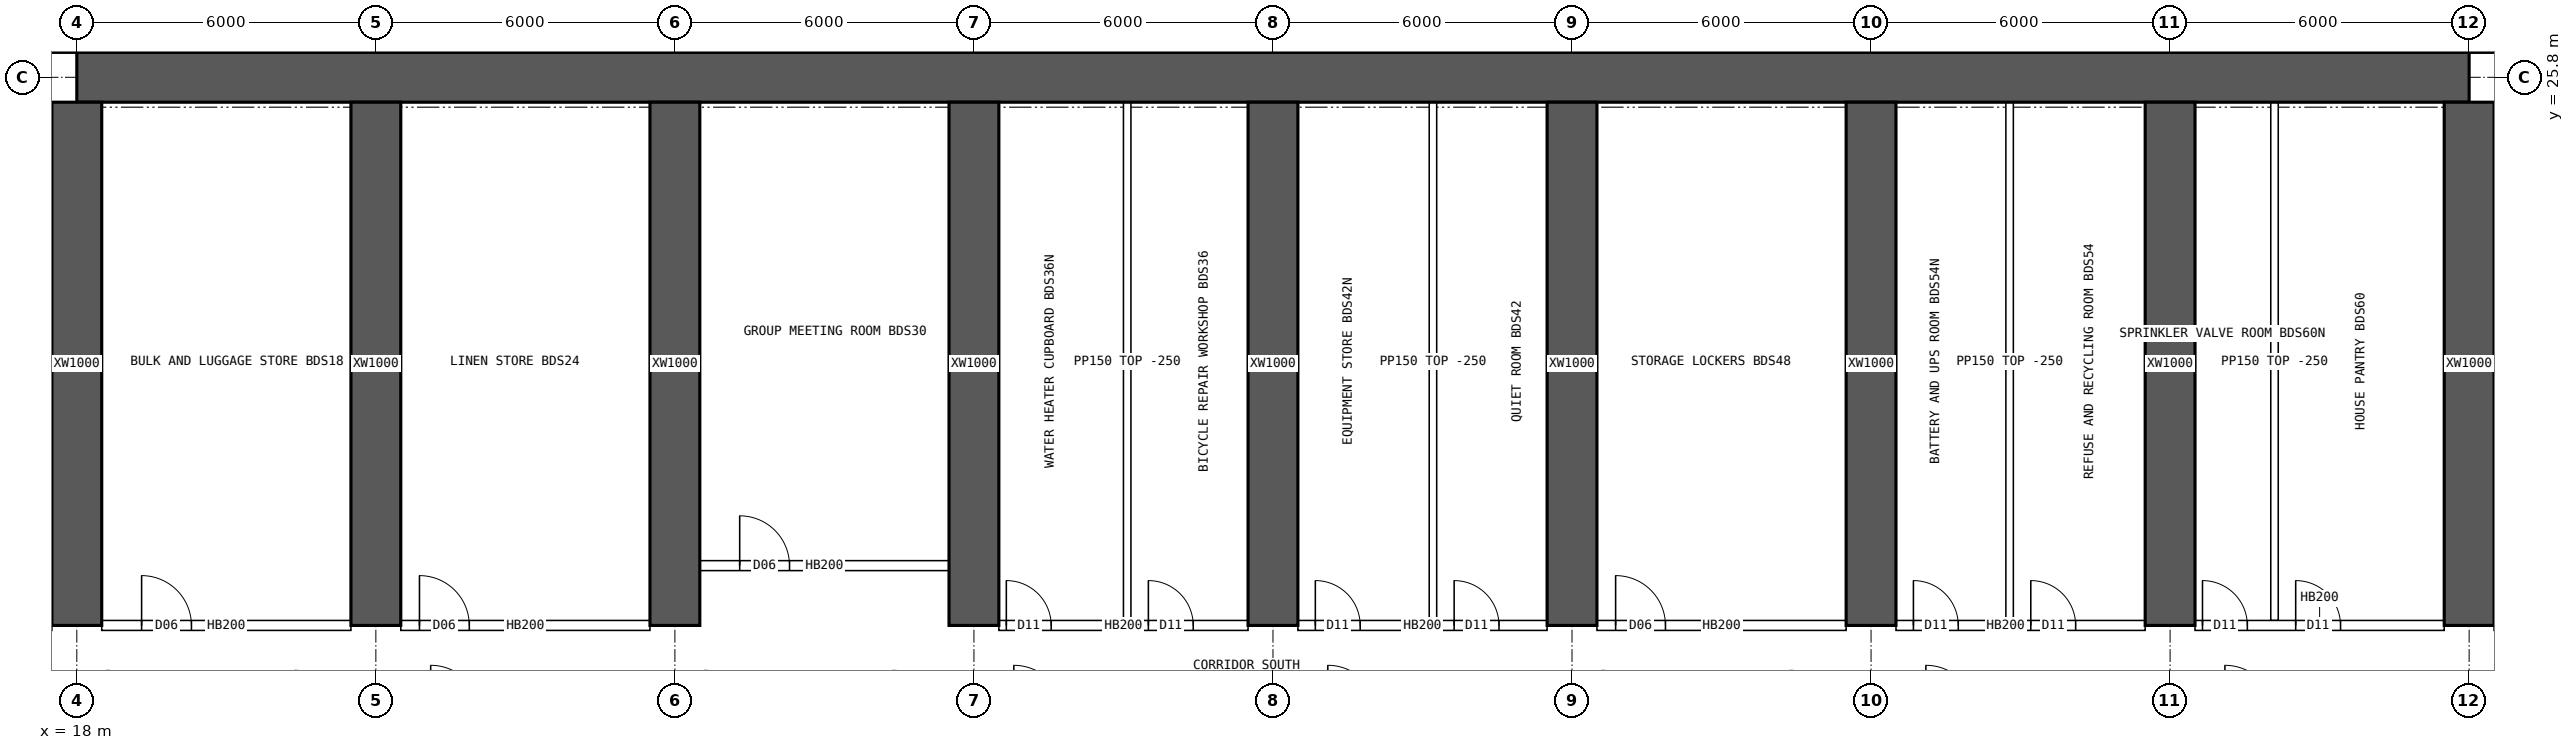
"""IFC4 building model, lengths in metres.
Left out: names, types, materials, properties, quantities, classifications, styles, units other than length and angle.
Written with IfcOpenShell. Run it as: python <this file> out.ifc"""

import sys

from ifc_helpers import new_model, si_unit, direction, frame, frame_2d, origin, place, context, subcontext, project, spatial, rectangle, extrude, element, fill, save


model = new_model("IFC4")
c1 = context("Model", 3, precision=1e-05, world=origin(), true_north=direction((0.0, 1.0)))
c2 = subcontext(c1, "Body", "Model", "MODEL_VIEW")
j1 = project(units=[si_unit("LENGTHUNIT", "METRE"), si_unit("PLANEANGLEUNIT", "RADIAN")], contexts=[c1])
p1 = place(None, origin())
s1 = spatial("IfcSite", under=j1, at=p1, CompositionType="ELEMENT")
p2 = place(p1, origin())
s2 = spatial("IfcBuilding", under=s1, at=p2, CompositionType="ELEMENT")
p3 = place(p2, frame((0.0, 0.0, 57.7)))
s3 = spatial("IfcBuildingStorey", under=s2, at=p3, CompositionType="ELEMENT", Elevation=57.7)
p4 = place(p3, frame((18.0, 25.8, 0.0), z_axis=(0.0, 0.0, 1.0), x_axis=(1.0, 0.0, 0.0)))
e1 = element("IfcWall", 1, at=p4, inside=s3, PredefinedType="SHEAR", context=c2, shape_type="SweptSolid", body=[
    extrude(rectangle(XDim=48.0, YDim=1.0, at=frame_2d((24.0, 0.0))), origin(), (0.0, 0.0, 1.0), 3.75),
])
for number, where, z_axis, x_axis in (
    (2, (18.0, 14.8, 0.0), (0.0, 0.0, 1.0), (0.0, 1.0, 0.0)),
    (3, (24.0, 14.8, 0.0), (0.0, 0.0, 1.0), (0.0, 1.0, 0.0)),
    (4, (30.0, 14.8, 0.0), (0.0, 0.0, 1.0), (0.0, 1.0, 0.0)),
    (5, (36.0, 14.8, 0.0), (0.0, 0.0, 1.0), (0.0, 1.0, 0.0)),
    (6, (42.0, 14.8, 0.0), (0.0, 0.0, 1.0), (0.0, 1.0, 0.0)),
    (7, (48.0, 14.8, 0.0), (0.0, 0.0, 1.0), (0.0, 1.0, 0.0)),
    (8, (54.0, 14.8, 0.0), (0.0, 0.0, 1.0), (0.0, 1.0, 0.0)),
    (9, (60.0, 14.8, 0.0), (0.0, 0.0, 1.0), (0.0, 1.0, 0.0)),
    (10, (66.0, 14.8, 0.0), (0.0, 0.0, 1.0), (0.0, 1.0, 0.0)),
):
    element("IfcWall", number, at=place(p3, frame(where, z_axis=z_axis, x_axis=x_axis)), inside=s3, PredefinedType="SHEAR", context=c2, shape_type="SweptSolid", body=[
        extrude(rectangle(XDim=10.5, YDim=1.0, at=frame_2d((5.25, 0.0))), origin(), (0.0, 0.0, 1.0), 3.75),
    ])
p5 = place(p3, frame((18.5, 14.8, 0.0), z_axis=(0.0, 0.0, 1.0), x_axis=(1.0, 0.0, 0.0)))
e11 = element("IfcWall", 11, at=p5, inside=s3, PredefinedType="SOLIDWALL", context=c2, shape_type="SweptSolid", body=[
    extrude(rectangle(XDim=5.0, YDim=0.2, at=frame_2d((2.5, 0.0))), origin(), (0.0, 0.0, 1.0), 3.5),
])
p6 = place(p5, frame((0.8, 0.0, 0.0)))
e12 = element("IfcOpeningElement", 12, at=p6, cuts=e11, PredefinedType="OPENING", context=c2, shape_type="SweptSolid", body=[
    extrude(rectangle(XDim=1.0, YDim=2.1, at=frame_2d((0.5, 1.05))), frame((0.0, 0.11, 0.0), z_axis=(0.0, -1.0, 0.0), x_axis=(1.0, 0.0, 0.0)), (0.0, 0.0, 1.0), 0.22),
])
p7 = place(p3, frame((24.5, 14.8, 0.0), z_axis=(0.0, 0.0, 1.0), x_axis=(1.0, 0.0, 0.0)))
e13 = element("IfcWall", 13, at=p7, inside=s3, PredefinedType="SOLIDWALL", context=c2, shape_type="SweptSolid", body=[
    extrude(rectangle(XDim=5.0, YDim=0.2, at=frame_2d((2.5, 0.0))), origin(), (0.0, 0.0, 1.0), 3.5),
])
p8 = place(p7, frame((0.375, 0.0, 0.0)))
e14 = element("IfcOpeningElement", 14, at=p8, cuts=e13, PredefinedType="OPENING", context=c2, shape_type="SweptSolid", body=[
    extrude(rectangle(XDim=1.0, YDim=2.1, at=frame_2d((0.5, 1.05))), frame((0.0, 0.11, 0.0), z_axis=(0.0, -1.0, 0.0), x_axis=(1.0, 0.0, 0.0)), (0.0, 0.0, 1.0), 0.22),
])
p9 = place(p3, frame((36.5, 14.8, 0.0), z_axis=(0.0, 0.0, 1.0), x_axis=(1.0, 0.0, 0.0)))
e15 = element("IfcWall", 15, at=p9, inside=s3, PredefinedType="SOLIDWALL", context=c2, shape_type="SweptSolid", body=[
    extrude(rectangle(XDim=5.0, YDim=0.2, at=frame_2d((2.5, 0.0))), origin(), (0.0, 0.0, 1.0), 3.5),
])
p10 = place(p9, frame((0.15, 0.0, 0.0)))
e16 = element("IfcOpeningElement", 16, at=p10, cuts=e15, PredefinedType="OPENING", context=c2, shape_type="SweptSolid", body=[
    extrude(rectangle(XDim=0.9, YDim=2.1, at=frame_2d((0.45, 1.05))), frame((0.0, 0.11, 0.0), z_axis=(0.0, -1.0, 0.0), x_axis=(1.0, 0.0, 0.0)), (0.0, 0.0, 1.0), 0.22),
])
p11 = place(p9, frame((3.0, 0.0, 0.0)))
e17 = element("IfcOpeningElement", 17, at=p11, cuts=e15, PredefinedType="OPENING", context=c2, shape_type="SweptSolid", body=[
    extrude(rectangle(XDim=0.9, YDim=2.1, at=frame_2d((0.45, 1.05))), frame((0.0, 0.11, 0.0), z_axis=(0.0, -1.0, 0.0), x_axis=(1.0, 0.0, 0.0)), (0.0, 0.0, 1.0), 0.22),
])
p12 = place(p3, frame((42.5, 14.8, 0.0), z_axis=(0.0, 0.0, 1.0), x_axis=(1.0, 0.0, 0.0)))
e18 = element("IfcWall", 18, at=p12, inside=s3, PredefinedType="SOLIDWALL", context=c2, shape_type="SweptSolid", body=[
    extrude(rectangle(XDim=5.0, YDim=0.2, at=frame_2d((2.5, 0.0))), origin(), (0.0, 0.0, 1.0), 3.5),
])
p13 = place(p12, frame((0.35, 0.0, 0.0)))
e19 = element("IfcOpeningElement", 19, at=p13, cuts=e18, PredefinedType="OPENING", context=c2, shape_type="SweptSolid", body=[
    extrude(rectangle(XDim=0.9, YDim=2.1, at=frame_2d((0.45, 1.05))), frame((0.0, 0.11, 0.0), z_axis=(0.0, -1.0, 0.0), x_axis=(1.0, 0.0, 0.0)), (0.0, 0.0, 1.0), 0.22),
])
p14 = place(p12, frame((3.135, 0.0, 0.0)))
e20 = element("IfcOpeningElement", 20, at=p14, cuts=e18, PredefinedType="OPENING", context=c2, shape_type="SweptSolid", body=[
    extrude(rectangle(XDim=0.9, YDim=2.1, at=frame_2d((0.45, 1.05))), frame((0.0, 0.11, 0.0), z_axis=(0.0, -1.0, 0.0), x_axis=(1.0, 0.0, 0.0)), (0.0, 0.0, 1.0), 0.22),
])
p15 = place(p3, frame((48.5, 14.8, 0.0), z_axis=(0.0, 0.0, 1.0), x_axis=(1.0, 0.0, 0.0)))
e21 = element("IfcWall", 21, at=p15, inside=s3, PredefinedType="SOLIDWALL", context=c2, shape_type="SweptSolid", body=[
    extrude(rectangle(XDim=5.0, YDim=0.2, at=frame_2d((2.5, 0.0))), origin(), (0.0, 0.0, 1.0), 3.5),
])
p16 = place(p15, frame((0.375, 0.0, 0.0)))
e22 = element("IfcOpeningElement", 22, at=p16, cuts=e21, PredefinedType="OPENING", context=c2, shape_type="SweptSolid", body=[
    extrude(rectangle(XDim=1.0, YDim=2.1, at=frame_2d((0.5, 1.05))), frame((0.0, 0.11, 0.0), z_axis=(0.0, -1.0, 0.0), x_axis=(1.0, 0.0, 0.0)), (0.0, 0.0, 1.0), 0.22),
])
p17 = place(p3, frame((54.5, 14.8, 0.0), z_axis=(0.0, 0.0, 1.0), x_axis=(1.0, 0.0, 0.0)))
e23 = element("IfcWall", 23, at=p17, inside=s3, PredefinedType="SOLIDWALL", context=c2, shape_type="SweptSolid", body=[
    extrude(rectangle(XDim=5.0, YDim=0.2, at=frame_2d((2.5, 0.0))), origin(), (0.0, 0.0, 1.0), 3.5),
])
p18 = place(p17, frame((0.35, 0.0, 0.0)))
e24 = element("IfcOpeningElement", 24, at=p18, cuts=e23, PredefinedType="OPENING", context=c2, shape_type="SweptSolid", body=[
    extrude(rectangle(XDim=0.9, YDim=2.1, at=frame_2d((0.45, 1.05))), frame((0.0, 0.11, 0.0), z_axis=(0.0, -1.0, 0.0), x_axis=(1.0, 0.0, 0.0)), (0.0, 0.0, 1.0), 0.22),
])
p19 = place(p17, frame((2.705, 0.0, 0.0)))
e25 = element("IfcOpeningElement", 25, at=p19, cuts=e23, PredefinedType="OPENING", context=c2, shape_type="SweptSolid", body=[
    extrude(rectangle(XDim=0.9, YDim=2.1, at=frame_2d((0.45, 1.05))), frame((0.0, 0.11, 0.0), z_axis=(0.0, -1.0, 0.0), x_axis=(1.0, 0.0, 0.0)), (0.0, 0.0, 1.0), 0.22),
])
p20 = place(p3, frame((60.5, 14.8, 0.0), z_axis=(0.0, 0.0, 1.0), x_axis=(1.0, 0.0, 0.0)))
e26 = element("IfcWall", 26, at=p20, inside=s3, PredefinedType="SOLIDWALL", context=c2, shape_type="SweptSolid", body=[
    extrude(rectangle(XDim=5.0, YDim=0.2, at=frame_2d((2.5, 0.0))), origin(), (0.0, 0.0, 1.0), 3.5),
])
p21 = place(p20, frame((0.15, 0.0, 0.0)))
e27 = element("IfcOpeningElement", 27, at=p21, cuts=e26, PredefinedType="OPENING", context=c2, shape_type="SweptSolid", body=[
    extrude(rectangle(XDim=0.9, YDim=2.1, at=frame_2d((0.45, 1.05))), frame((0.0, 0.11, 0.0), z_axis=(0.0, -1.0, 0.0), x_axis=(1.0, 0.0, 0.0)), (0.0, 0.0, 1.0), 0.22),
])
p22 = place(p20, frame((2.02, 0.0, 0.0)))
e28 = element("IfcOpeningElement", 28, at=p22, cuts=e26, PredefinedType="OPENING", context=c2, shape_type="SweptSolid", body=[
    extrude(rectangle(XDim=0.9, YDim=2.1, at=frame_2d((0.45, 1.05))), frame((0.0, 0.11, 0.0), z_axis=(0.0, -1.0, 0.0), x_axis=(1.0, 0.0, 0.0)), (0.0, 0.0, 1.0), 0.22),
])
p23 = place(p3, frame((30.5, 16.0, 0.0), z_axis=(0.0, 0.0, 1.0), x_axis=(1.0, 0.0, 0.0)))
e29 = element("IfcWall", 29, at=p23, inside=s3, PredefinedType="SOLIDWALL", context=c2, shape_type="SweptSolid", body=[
    extrude(rectangle(XDim=5.0, YDim=0.2, at=frame_2d((2.5, 0.0))), origin(), (0.0, 0.0, 1.0), 3.5),
])
p24 = place(p23, frame((0.8, 0.0, 0.0)))
e30 = element("IfcOpeningElement", 30, at=p24, cuts=e29, PredefinedType="OPENING", context=c2, shape_type="SweptSolid", body=[
    extrude(rectangle(XDim=1.0, YDim=2.1, at=frame_2d((0.5, 1.05))), frame((0.0, 0.11, 0.0), z_axis=(0.0, -1.0, 0.0), x_axis=(1.0, 0.0, 0.0)), (0.0, 0.0, 1.0), 0.22),
])
for number, where, z_axis, x_axis in (
    (31, (39.075, 14.9, 0.0), (0.0, 0.0, 1.0), (0.0, 1.0, 0.0)),
    (32, (45.21, 14.9, 0.0), (0.0, 0.0, 1.0), (0.0, 1.0, 0.0)),
    (33, (56.78, 14.9, 0.0), (0.0, 0.0, 1.0), (0.0, 1.0, 0.0)),
    (34, (62.095, 14.9, 0.0), (0.0, 0.0, 1.0), (0.0, 1.0, 0.0)),
):
    element("IfcWall", number, at=place(p3, frame(where, z_axis=z_axis, x_axis=x_axis)), inside=s3, PredefinedType="PARTITIONING", context=c2, shape_type="SweptSolid", body=[
        extrude(rectangle(XDim=10.4, YDim=0.15, at=frame_2d((5.2, 0.0))), origin(), (0.0, 0.0, 1.0), 3.5),
    ])
p25 = place(p6, origin())
e35 = element("IfcDoor", 35, at=p25, inside=s3, OperationType="SINGLE_SWING_LEFT", PredefinedType="DOOR", context=c2, shape_type="SweptSolid", body=[
    extrude(rectangle(XDim=1.0, YDim=2.1, at=frame_2d((0.5, 1.05))), frame((0.0, 0.025, 0.0), z_axis=(0.0, -1.0, 0.0), x_axis=(1.0, 0.0, 0.0)), (0.0, 0.0, 1.0), 0.05),
])
fill(e12, e35)
p26 = place(p8, origin())
e36 = element("IfcDoor", 36, at=p26, inside=s3, OperationType="SINGLE_SWING_LEFT", PredefinedType="DOOR", context=c2, shape_type="SweptSolid", body=[
    extrude(rectangle(XDim=1.0, YDim=2.1, at=frame_2d((0.5, 1.05))), frame((0.0, 0.025, 0.0), z_axis=(0.0, -1.0, 0.0), x_axis=(1.0, 0.0, 0.0)), (0.0, 0.0, 1.0), 0.05),
])
fill(e14, e36)
p27 = place(p24, origin())
e37 = element("IfcDoor", 37, at=p27, inside=s3, OperationType="SINGLE_SWING_LEFT", PredefinedType="DOOR", context=c2, shape_type="SweptSolid", body=[
    extrude(rectangle(XDim=1.0, YDim=2.1, at=frame_2d((0.5, 1.05))), frame((0.0, 0.025, 0.0), z_axis=(0.0, -1.0, 0.0), x_axis=(1.0, 0.0, 0.0)), (0.0, 0.0, 1.0), 0.05),
])
fill(e30, e37)
p28 = place(p10, origin())
e38 = element("IfcDoor", 38, at=p28, inside=s3, OperationType="SINGLE_SWING_LEFT", PredefinedType="DOOR", context=c2, shape_type="SweptSolid", body=[
    extrude(rectangle(XDim=0.9, YDim=2.1, at=frame_2d((0.45, 1.05))), frame((0.0, 0.025, 0.0), z_axis=(0.0, -1.0, 0.0), x_axis=(1.0, 0.0, 0.0)), (0.0, 0.0, 1.0), 0.05),
])
fill(e16, e38)
p29 = place(p11, origin())
e39 = element("IfcDoor", 39, at=p29, inside=s3, OperationType="SINGLE_SWING_LEFT", PredefinedType="DOOR", context=c2, shape_type="SweptSolid", body=[
    extrude(rectangle(XDim=0.9, YDim=2.1, at=frame_2d((0.45, 1.05))), frame((0.0, 0.025, 0.0), z_axis=(0.0, -1.0, 0.0), x_axis=(1.0, 0.0, 0.0)), (0.0, 0.0, 1.0), 0.05),
])
fill(e17, e39)
p30 = place(p13, origin())
e40 = element("IfcDoor", 40, at=p30, inside=s3, OperationType="SINGLE_SWING_LEFT", PredefinedType="DOOR", context=c2, shape_type="SweptSolid", body=[
    extrude(rectangle(XDim=0.9, YDim=2.1, at=frame_2d((0.45, 1.05))), frame((0.0, 0.025, 0.0), z_axis=(0.0, -1.0, 0.0), x_axis=(1.0, 0.0, 0.0)), (0.0, 0.0, 1.0), 0.05),
])
fill(e19, e40)
p31 = place(p14, origin())
e41 = element("IfcDoor", 41, at=p31, inside=s3, OperationType="SINGLE_SWING_LEFT", PredefinedType="DOOR", context=c2, shape_type="SweptSolid", body=[
    extrude(rectangle(XDim=0.9, YDim=2.1, at=frame_2d((0.45, 1.05))), frame((0.0, 0.025, 0.0), z_axis=(0.0, -1.0, 0.0), x_axis=(1.0, 0.0, 0.0)), (0.0, 0.0, 1.0), 0.05),
])
fill(e20, e41)
p32 = place(p16, origin())
e42 = element("IfcDoor", 42, at=p32, inside=s3, OperationType="SINGLE_SWING_LEFT", PredefinedType="DOOR", context=c2, shape_type="SweptSolid", body=[
    extrude(rectangle(XDim=1.0, YDim=2.1, at=frame_2d((0.5, 1.05))), frame((0.0, 0.025, 0.0), z_axis=(0.0, -1.0, 0.0), x_axis=(1.0, 0.0, 0.0)), (0.0, 0.0, 1.0), 0.05),
])
fill(e22, e42)
p33 = place(p18, origin())
e43 = element("IfcDoor", 43, at=p33, inside=s3, OperationType="SINGLE_SWING_LEFT", PredefinedType="DOOR", context=c2, shape_type="SweptSolid", body=[
    extrude(rectangle(XDim=0.9, YDim=2.1, at=frame_2d((0.45, 1.05))), frame((0.0, 0.025, 0.0), z_axis=(0.0, -1.0, 0.0), x_axis=(1.0, 0.0, 0.0)), (0.0, 0.0, 1.0), 0.05),
])
fill(e24, e43)
p34 = place(p19, origin())
e44 = element("IfcDoor", 44, at=p34, inside=s3, OperationType="SINGLE_SWING_LEFT", PredefinedType="DOOR", context=c2, shape_type="SweptSolid", body=[
    extrude(rectangle(XDim=0.9, YDim=2.1, at=frame_2d((0.45, 1.05))), frame((0.0, 0.025, 0.0), z_axis=(0.0, -1.0, 0.0), x_axis=(1.0, 0.0, 0.0)), (0.0, 0.0, 1.0), 0.05),
])
fill(e25, e44)
p35 = place(p21, origin())
e45 = element("IfcDoor", 45, at=p35, inside=s3, OperationType="SINGLE_SWING_LEFT", PredefinedType="DOOR", context=c2, shape_type="SweptSolid", body=[
    extrude(rectangle(XDim=0.9, YDim=2.1, at=frame_2d((0.45, 1.05))), frame((0.0, 0.025, 0.0), z_axis=(0.0, -1.0, 0.0), x_axis=(1.0, 0.0, 0.0)), (0.0, 0.0, 1.0), 0.05),
])
fill(e27, e45)
p36 = place(p22, origin())
e46 = element("IfcDoor", 46, at=p36, inside=s3, OperationType="SINGLE_SWING_LEFT", PredefinedType="DOOR", context=c2, shape_type="SweptSolid", body=[
    extrude(rectangle(XDim=0.9, YDim=2.1, at=frame_2d((0.45, 1.05))), frame((0.0, 0.025, 0.0), z_axis=(0.0, -1.0, 0.0), x_axis=(1.0, 0.0, 0.0)), (0.0, 0.0, 1.0), 0.05),
])
fill(e28, e46)
save(model, sys.argv[1])
